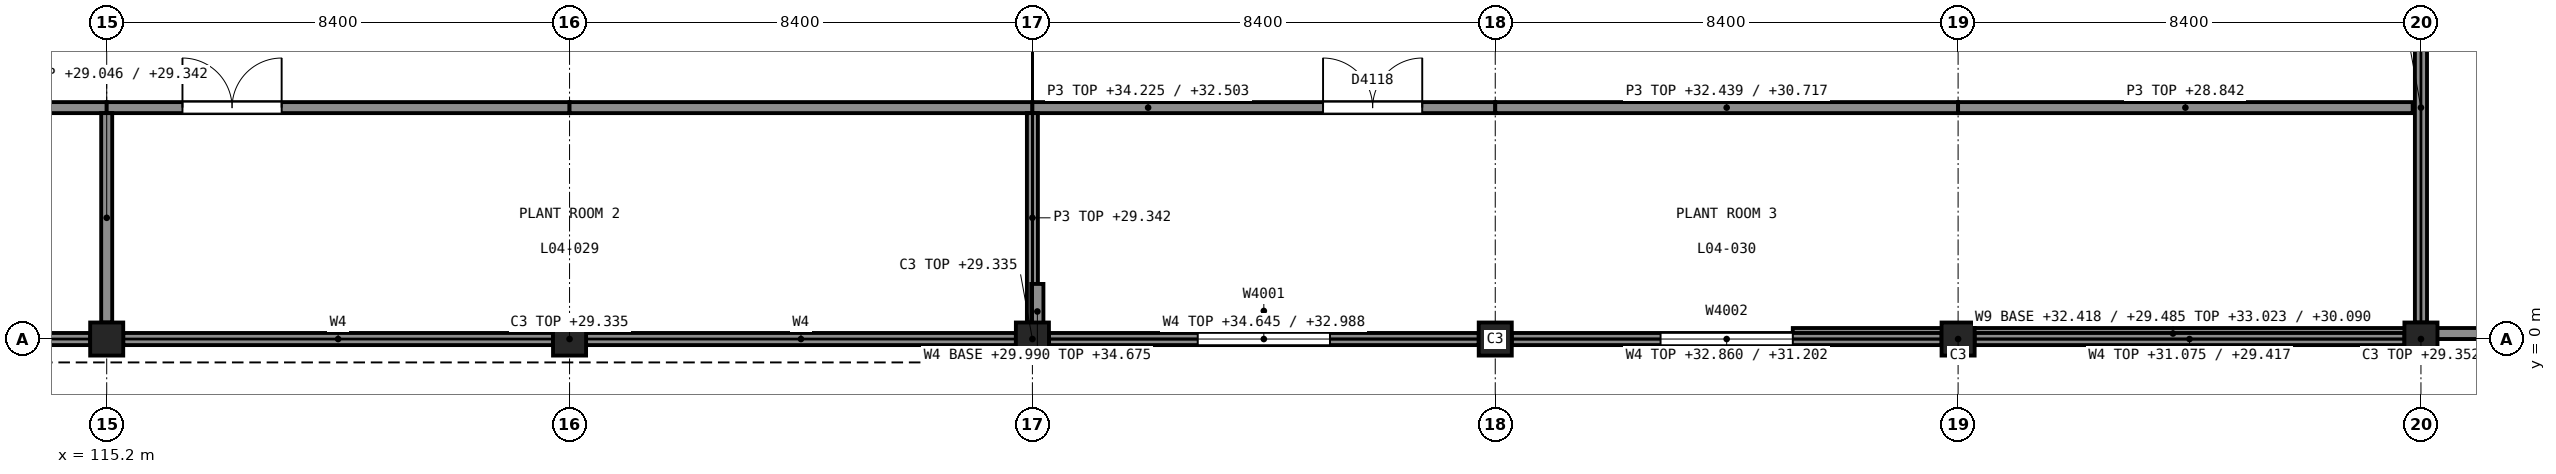
"""IFC4 building model, lengths in metres.
Left out: names, types, materials, properties, quantities, classifications, styles, units other than length and angle.
Written with IfcOpenShell. Run it as: python <this file> out.ifc"""

import sys

from ifc_helpers import new_model, si_unit, direction, frame, frame_2d, origin, origin_2d, place, context, subcontext, project, spatial, polyline, rectangle, outline, extrude, element, fill, save


model = new_model("IFC4")
c1 = context("Model", 3, precision=1e-05, world=origin(), true_north=direction((0.0, 1.0)))
c2 = subcontext(c1, "Body", "Model", "MODEL_VIEW")
j1 = project(units=[si_unit("LENGTHUNIT", "METRE"), si_unit("PLANEANGLEUNIT", "RADIAN")], contexts=[c1])
p1 = place(None, origin())
s1 = spatial("IfcSite", under=j1, at=p1, CompositionType="ELEMENT")
p2 = place(p1, origin())
s2 = spatial("IfcBuilding", under=s1, at=p2, CompositionType="ELEMENT")
p3 = place(p2, frame((0.0, 0.0, 25.0)))
s3 = spatial("IfcBuildingStorey", under=s2, at=p3, CompositionType="ELEMENT", Elevation=25.0)
for number, where, z_axis, x_axis in (
    (1, (115.2, 0.0, 0.0), (0.0, 0.0, 1.0), (1.0, 0.0, 0.0)),
    (2, (123.6, 0.0, 0.0), (0.0, 0.0, 1.0), (1.0, 0.0, 0.0)),
    (3, (132.0, 0.0, 0.0), (0.0, 0.0, 1.0), (1.0, 0.0, 0.0)),
):
    element("IfcColumn", number, at=place(p3, frame(where, z_axis=z_axis, x_axis=x_axis)), inside=s3, PredefinedType="COLUMN", context=c2, shape_type="SweptSolid", body=[
        extrude(rectangle(XDim=0.6, YDim=0.6, at=origin_2d()), origin(), (0.0, 0.0, 1.0), 4.335),
    ])
for number, where, z_axis, x_axis in (
    (4, (140.4, 0.0, 0.0), (0.0, 0.0, 1.0), (1.0, 0.0, 0.0)),
    (5, (148.8, 0.0, 0.0), (0.0, 0.0, 1.0), (1.0, 0.0, 0.0)),
):
    element("IfcColumn", number, at=place(p3, frame(where, z_axis=z_axis, x_axis=x_axis)), inside=s3, PredefinedType="COLUMN", context=c2, shape_type="SweptSolid", body=[
        extrude(rectangle(XDim=0.6, YDim=0.6, at=origin_2d()), origin(), (0.0, 0.0, 1.0), 5.0),
    ])
p4 = place(p3, frame((157.2, 0.0, 0.0), z_axis=(0.0, 0.0, 1.0), x_axis=(1.0, 0.0, 0.0)))
e6 = element("IfcColumn", 6, at=p4, inside=s3, PredefinedType="COLUMN", context=c2, shape_type="SweptSolid", body=[
    extrude(rectangle(XDim=0.6, YDim=0.6, at=origin_2d()), origin(), (0.0, 0.0, 1.0), 4.353),
])
p5 = place(p3, frame((107.1, 0.0, 0.0), z_axis=(0.0, 0.0, 1.0), x_axis=(1.0, 0.0, 0.0)))
e7 = element("IfcWall", 7, at=p5, inside=s3, PredefinedType="SOLIDWALL", context=c2, shape_type="SweptSolid", body=[
    extrude(rectangle(XDim=7.8, YDim=0.22, at=frame_2d((3.9, 0.0))), origin(), (0.0, 0.0, 1.0), 4.334),
])
for number, where, z_axis, x_axis in (
    (8, (115.5, 0.0, 0.0), (0.0, 0.0, 1.0), (1.0, 0.0, 0.0)),
    (9, (123.9, 0.0, 0.0), (0.0, 0.0, 1.0), (1.0, 0.0, 0.0)),
):
    element("IfcWall", number, at=place(p3, frame(where, z_axis=z_axis, x_axis=x_axis)), inside=s3, PredefinedType="SOLIDWALL", context=c2, shape_type="SweptSolid", body=[
        extrude(rectangle(XDim=7.8, YDim=0.22, at=frame_2d((3.9, 0.0))), origin(), (0.0, 0.0, 1.0), 4.334),
    ])
p6 = place(p3, frame((132.3, 0.0, 0.0), z_axis=(0.0, 0.0, 1.0), x_axis=(1.0, 0.0, 0.0)))
e10 = element("IfcWall", 10, at=p6, inside=s3, PredefinedType="SOLIDWALL", context=c2, shape_type="SweptSolid", body=[
    extrude(outline(polyline([(0.0, 0.0), (7.8, 0.0), (7.8, 7.988), (0.0, 9.646), (0.0, 0.0)])), frame((0.0, 0.11, 0.0), z_axis=(0.0, -1.0, 0.0), x_axis=(1.0, 0.0, 0.0)), (0.0, 0.0, 1.0), 0.22),
])
p7 = place(p6, frame((2.7, 0.0, 3.4)))
e11 = element("IfcOpeningElement", 11, at=p7, cuts=e10, PredefinedType="OPENING", context=c2, shape_type="SweptSolid", body=[
    extrude(rectangle(XDim=2.4, YDim=0.9, at=frame_2d((1.2, 0.45))), frame((0.0, 0.12, 0.0), z_axis=(0.0, -1.0, 0.0), x_axis=(1.0, 0.0, 0.0)), (0.0, 0.0, 1.0), 0.24),
])
p8 = place(p3, frame((140.7, 0.0, 0.0), z_axis=(0.0, 0.0, 1.0), x_axis=(1.0, 0.0, 0.0)))
e12 = element("IfcWall", 12, at=p8, inside=s3, PredefinedType="SOLIDWALL", context=c2, shape_type="SweptSolid", body=[
    extrude(outline(polyline([(0.0, 0.0), (7.8, 0.0), (7.8, 6.202), (0.0, 7.86), (0.0, 0.0)])), frame((0.0, 0.11, 0.0), z_axis=(0.0, -1.0, 0.0), x_axis=(1.0, 0.0, 0.0)), (0.0, 0.0, 1.0), 0.22),
])
p9 = place(p8, frame((2.7, 0.0, 3.4)))
e13 = element("IfcOpeningElement", 13, at=p9, cuts=e12, PredefinedType="OPENING", context=c2, shape_type="SweptSolid", body=[
    extrude(rectangle(XDim=2.4, YDim=0.9, at=frame_2d((1.2, 0.45))), frame((0.0, 0.12, 0.0), z_axis=(0.0, -1.0, 0.0), x_axis=(1.0, 0.0, 0.0)), (0.0, 0.0, 1.0), 0.24),
])
p10 = place(p3, frame((149.1, 0.0, 0.0), z_axis=(0.0, 0.0, 1.0), x_axis=(1.0, 0.0, 0.0)))
e14 = element("IfcWall", 14, at=p10, inside=s3, PredefinedType="SOLIDWALL", context=c2, shape_type="SweptSolid", body=[
    extrude(outline(polyline([(0.0, 0.0), (7.8, 0.0), (7.8, 4.417), (0.0, 6.075), (0.0, 0.0)])), frame((0.0, 0.11, 0.0), z_axis=(0.0, -1.0, 0.0), x_axis=(1.0, 0.0, 0.0)), (0.0, 0.0, 1.0), 0.22),
])
p11 = place(p3, frame((157.2, 0.3, 0.0), z_axis=(0.0, 0.0, 1.0), x_axis=(0.0, 1.0, 0.0)))
e15 = element("IfcWall", 15, at=p11, inside=s3, PredefinedType="SOLIDWALL", context=c2, shape_type="SweptSolid", body=[
    extrude(rectangle(XDim=7.8, YDim=0.22, at=frame_2d((3.9, 0.0))), origin(), (0.0, 0.0, 1.0), 4.353),
])
p12 = place(p3, frame((145.8, 0.1, 4.485), z_axis=(0.0, 0.0, 1.0), x_axis=(1.0, 0.0, 0.0)))
e16 = element("IfcWall", 16, at=p12, inside=s3, PredefinedType="PARAPET", context=c2, shape_type="SweptSolid", body=[
    extrude(outline(polyline([(0.0, 2.932), (13.8, 0.0), (13.8, 0.605), (0.0, 3.537), (0.0, 2.932)])), frame((0.0, 0.1, 0.0), z_axis=(0.0, -1.0, 0.0), x_axis=(1.0, 0.0, 0.0)), (0.0, 0.0, 1.0), 0.2),
])
p13 = place(p3, frame((132.09, 0.0, 4.99), z_axis=(0.0, 0.0, 1.0), x_axis=(0.0, 1.0, 0.0)))
e17 = element("IfcWall", 17, at=p13, inside=s3, PredefinedType="SOLIDWALL", context=c2, shape_type="SweptSolid", body=[
    extrude(rectangle(XDim=1.0, YDim=0.22, at=frame_2d((0.5, 0.0))), origin(), (0.0, 0.0, 1.0), 4.685),
])
p14 = place(p3, frame((106.8, 4.2, 0.0), z_axis=(0.0, 0.0, 1.0), x_axis=(1.0, 0.0, 0.0)))
e18 = element("IfcWall", 18, at=p14, inside=s3, PredefinedType="PARTITIONING", context=c2, shape_type="SweptSolid", body=[
    extrude(outline(polyline([(0.0, 0.0), (8.4, 0.0), (8.4, 5.265), (5.25, 5.265), (4.2, 4.342), (3.15, 5.265), (0.0, 5.265), (0.0, 0.0)])), frame((0.0, 0.1, 0.0), z_axis=(0.0, -1.0, 0.0), x_axis=(1.0, 0.0, 0.0)), (0.0, 0.0, 1.0), 0.2),
])
p15 = place(p3, frame((115.2, 4.2, 0.0), z_axis=(0.0, 0.0, 1.0), x_axis=(1.0, 0.0, 0.0)))
e19 = element("IfcWall", 19, at=p15, inside=s3, PredefinedType="PARTITIONING", context=c2, shape_type="SweptSolid", body=[
    extrude(outline(polyline([(0.0, 0.0), (8.4, 0.0), (8.4, 5.265), (5.25, 5.265), (4.2, 4.342), (3.15, 5.265), (0.0, 5.265), (0.0, 0.0)])), frame((0.0, 0.1, 0.0), z_axis=(0.0, -1.0, 0.0), x_axis=(1.0, 0.0, 0.0)), (0.0, 0.0, 1.0), 0.2),
])
p16 = place(p15, frame((1.375, 0.0, 0.0)))
e20 = element("IfcOpeningElement", 20, at=p16, cuts=e19, PredefinedType="OPENING", context=c2, shape_type="SweptSolid", body=[
    extrude(rectangle(XDim=1.8, YDim=2.1, at=frame_2d((0.9, 1.05))), frame((0.0, 0.11, 0.0), z_axis=(0.0, -1.0, 0.0), x_axis=(1.0, 0.0, 0.0)), (0.0, 0.0, 1.0), 0.22),
])
p17 = place(p3, frame((123.6, 4.2, 0.0), z_axis=(0.0, 0.0, 1.0), x_axis=(1.0, 0.0, 0.0)))
e21 = element("IfcWall", 21, at=p17, inside=s3, PredefinedType="PARTITIONING", context=c2, shape_type="SweptSolid", body=[
    extrude(outline(polyline([(0.0, 0.0), (8.4, 0.0), (8.4, 5.265), (7.35, 5.265), (6.3, 4.489), (5.25, 5.265), (4.2, 4.342), (3.15, 5.265), (0.0, 5.265), (0.0, 0.0)])), frame((0.0, 0.1, 0.0), z_axis=(0.0, -1.0, 0.0), x_axis=(1.0, 0.0, 0.0)), (0.0, 0.0, 1.0), 0.2),
])
p18 = place(p3, frame((132.0, 4.2, 0.0), z_axis=(0.0, 0.0, 1.0), x_axis=(1.0, 0.0, 0.0)))
e22 = element("IfcWall", 22, at=p18, inside=s3, PredefinedType="PARTITIONING", context=c2, shape_type="SweptSolid", body=[
    extrude(outline(polyline([(0.0, 0.0), (8.4, 0.0), (8.4, 7.503), (7.35, 7.694), (6.3, 7.917), (5.25, 8.141), (1.05, 9.033), (0.0, 9.225), (0.0, 0.0)])), frame((0.0, 0.1, 0.0), z_axis=(0.0, -1.0, 0.0), x_axis=(1.0, 0.0, 0.0)), (0.0, 0.0, 1.0), 0.2),
])
p19 = place(p18, frame((5.275, 0.0, 0.0)))
e23 = element("IfcOpeningElement", 23, at=p19, cuts=e22, PredefinedType="OPENING", context=c2, shape_type="SweptSolid", body=[
    extrude(rectangle(XDim=1.8, YDim=2.1, at=frame_2d((0.9, 1.05))), frame((0.0, 0.11, 0.0), z_axis=(0.0, -1.0, 0.0), x_axis=(1.0, 0.0, 0.0)), (0.0, 0.0, 1.0), 0.22),
])
p20 = place(p3, frame((140.4, 4.2, 0.0), z_axis=(0.0, 0.0, 1.0), x_axis=(1.0, 0.0, 0.0)))
e24 = element("IfcWall", 24, at=p20, inside=s3, PredefinedType="PARTITIONING", context=c2, shape_type="SweptSolid", body=[
    extrude(outline(polyline([(0.0, 0.0), (8.4, 0.0), (8.4, 5.717), (7.35, 5.909), (3.15, 6.801), (2.1, 7.025), (1.05, 7.248), (0.0, 7.439), (0.0, 0.0)])), frame((0.0, 0.1, 0.0), z_axis=(0.0, -1.0, 0.0), x_axis=(1.0, 0.0, 0.0)), (0.0, 0.0, 1.0), 0.2),
])
p21 = place(p3, frame((148.8, 4.2, 0.0), z_axis=(0.0, 0.0, 1.0), x_axis=(1.0, 0.0, 0.0)))
e25 = element("IfcWall", 25, at=p21, inside=s3, PredefinedType="PARTITIONING", context=c2, shape_type="SweptSolid", body=[
    extrude(rectangle(XDim=8.25, YDim=0.2, at=frame_2d((4.125, 0.0))), origin(), (0.0, 0.0, 1.0), 3.842),
])
p22 = place(p3, frame((115.2, 0.3, 0.0), z_axis=(0.0, 0.0, 1.0), x_axis=(0.0, 1.0, 0.0)))
e26 = element("IfcWall", 26, at=p22, inside=s3, PredefinedType="PARTITIONING", context=c2, shape_type="SweptSolid", body=[
    extrude(outline(polyline([(0.0, 0.0), (3.8, 0.0), (3.8, 4.342), (2.1, 4.342), (1.05, 4.339), (0.0, 4.046), (0.0, 0.0)])), frame((0.0, 0.1, 0.0), z_axis=(0.0, -1.0, 0.0), x_axis=(1.0, 0.0, 0.0)), (0.0, 0.0, 1.0), 0.2),
])
p23 = place(p3, frame((132.0, 0.3, 0.0), z_axis=(0.0, 0.0, 1.0), x_axis=(0.0, 1.0, 0.0)))
e27 = element("IfcWall", 27, at=p23, inside=s3, PredefinedType="PARTITIONING", context=c2, shape_type="SweptSolid", body=[
    extrude(rectangle(XDim=3.8, YDim=0.2, at=frame_2d((1.9, 0.0))), origin(), (0.0, 0.0, 1.0), 4.342),
])
p24 = place(p7, origin())
e28 = element("IfcWindow", 28, at=p24, inside=s3, PartitioningType="SINGLE_PANEL", PredefinedType="WINDOW", context=c2, shape_type="SweptSolid", body=[
    extrude(rectangle(XDim=2.4, YDim=0.9, at=frame_2d((1.2, 0.45))), frame((0.0, 0.09, 0.0), z_axis=(0.0, -1.0, 0.0), x_axis=(1.0, 0.0, 0.0)), (0.0, 0.0, 1.0), 0.06),
])
fill(e11, e28)
p25 = place(p9, origin())
e29 = element("IfcWindow", 29, at=p25, inside=s3, PartitioningType="SINGLE_PANEL", PredefinedType="WINDOW", context=c2, shape_type="SweptSolid", body=[
    extrude(rectangle(XDim=2.4, YDim=0.9, at=frame_2d((1.2, 0.45))), frame((0.0, 0.09, 0.0), z_axis=(0.0, -1.0, 0.0), x_axis=(1.0, 0.0, 0.0)), (0.0, 0.0, 1.0), 0.06),
])
fill(e13, e29)
p26 = place(p16, origin())
e30 = element("IfcDoor", 30, at=p26, inside=s3, OperationType="DOUBLE_DOOR_SINGLE_SWING", PredefinedType="DOOR", context=c2, shape_type="SweptSolid", body=[
    extrude(rectangle(XDim=1.8, YDim=2.1, at=frame_2d((0.9, 1.05))), frame((0.0, 0.025, 0.0), z_axis=(0.0, -1.0, 0.0), x_axis=(1.0, 0.0, 0.0)), (0.0, 0.0, 1.0), 0.05),
])
fill(e20, e30)
p27 = place(p19, origin())
e31 = element("IfcDoor", 31, at=p27, inside=s3, OperationType="DOUBLE_DOOR_SINGLE_SWING", PredefinedType="DOOR", context=c2, shape_type="SweptSolid", body=[
    extrude(rectangle(XDim=1.8, YDim=2.1, at=frame_2d((0.9, 1.05))), frame((0.0, 0.025, 0.0), z_axis=(0.0, -1.0, 0.0), x_axis=(1.0, 0.0, 0.0)), (0.0, 0.0, 1.0), 0.05),
])
fill(e23, e31)
save(model, sys.argv[1])
